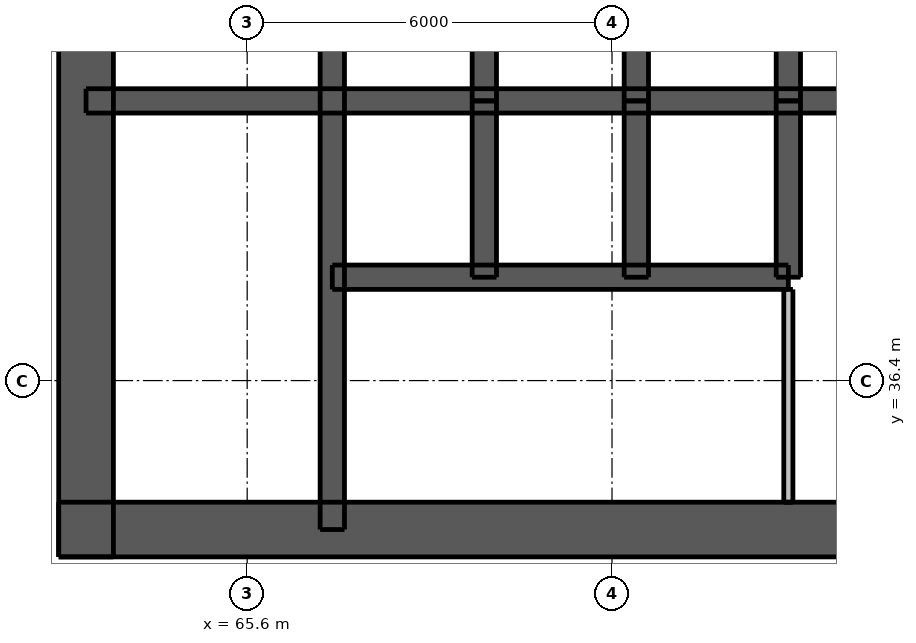
"""IFC4 building model, lengths in metres.
Left out: names, types, materials, properties, quantities, classifications, styles, units other than length and angle.
Written with IfcOpenShell. Run it as: python <this file> out.ifc"""

import sys

from ifc_helpers import new_model, si_unit, direction, frame, frame_2d, origin, place, context, subcontext, project, spatial, rectangle, extrude, element, fill, save


model = new_model("IFC4")
c1 = context("Model", 3, precision=1e-05, world=origin(), true_north=direction((0.0, 1.0)))
c2 = subcontext(c1, "Body", "Model", "MODEL_VIEW")
j1 = project(units=[si_unit("LENGTHUNIT", "METRE"), si_unit("PLANEANGLEUNIT", "RADIAN")], contexts=[c1])
p1 = place(None, origin())
s1 = spatial("IfcSite", under=j1, at=p1, CompositionType="ELEMENT")
p2 = place(p1, origin())
s2 = spatial("IfcBuilding", under=s1, at=p2, CompositionType="ELEMENT")
p3 = place(p2, frame((0.0, 0.0, 56.5)))
s3 = spatial("IfcBuildingStorey", under=s2, at=p3, CompositionType="ELEMENT", Elevation=56.5)
p4 = place(p3, frame((62.5, 33.95, 0.0), z_axis=(0.0, 0.0, 1.0), x_axis=(1.0, 0.0, 0.0)))
e1 = element("IfcWall", 1, at=p4, inside=s3, PredefinedType="SHEAR", context=c2, shape_type="SweptSolid", body=[
    extrude(rectangle(XDim=24.0, YDim=0.9, at=frame_2d((12.0, 0.0))), origin(), (0.0, 0.0, 1.0), 3.05),
])
p5 = place(p4, frame((2.05, 0.0, 0.0)))
e2 = element("IfcOpeningElement", 2, at=p5, cuts=e1, PredefinedType="OPENING", context=c2, shape_type="SweptSolid", body=[
    extrude(rectangle(XDim=1.1, YDim=2.1, at=frame_2d((0.55, 1.05))), frame((0.0, 0.46, 0.0), z_axis=(0.0, -1.0, 0.0), x_axis=(1.0, 0.0, 0.0)), (0.0, 0.0, 1.0), 0.92),
])
p6 = place(p4, frame((20.85, 0.0, 0.0)))
e3 = element("IfcOpeningElement", 3, at=p6, cuts=e1, PredefinedType="OPENING", context=c2, shape_type="SweptSolid", body=[
    extrude(rectangle(XDim=1.1, YDim=2.1, at=frame_2d((0.55, 1.05))), frame((0.0, 0.46, 0.0), z_axis=(0.0, -1.0, 0.0), x_axis=(1.0, 0.0, 0.0)), (0.0, 0.0, 1.0), 0.92),
])
p7 = place(p4, frame((8.0, 0.0, 0.0)))
e4 = element("IfcOpeningElement", 4, at=p7, cuts=e1, PredefinedType="OPENING", context=c2, shape_type="SweptSolid", body=[
    extrude(rectangle(XDim=1.1, YDim=2.1, at=frame_2d((0.55, 1.05))), frame((0.0, 0.46, 0.0), z_axis=(0.0, -1.0, 0.0), x_axis=(1.0, 0.0, 0.0)), (0.0, 0.0, 1.0), 0.92),
])
p8 = place(p4, frame((13.525, 0.0, 0.0)))
e5 = element("IfcOpeningElement", 5, at=p8, cuts=e1, PredefinedType="OPENING", context=c2, shape_type="SweptSolid", body=[
    extrude(rectangle(XDim=0.9, YDim=2.1, at=frame_2d((0.45, 1.05))), frame((0.0, 0.46, 0.0), z_axis=(0.0, -1.0, 0.0), x_axis=(1.0, 0.0, 0.0)), (0.0, 0.0, 1.0), 0.92),
])
p9 = place(p4, frame((17.075, 0.0, 0.0)))
e6 = element("IfcOpeningElement", 6, at=p9, cuts=e1, PredefinedType="OPENING", context=c2, shape_type="SweptSolid", body=[
    extrude(rectangle(XDim=0.9, YDim=2.1, at=frame_2d((0.45, 1.05))), frame((0.0, 0.46, 0.0), z_axis=(0.0, -1.0, 0.0), x_axis=(1.0, 0.0, 0.0)), (0.0, 0.0, 1.0), 0.92),
])
p10 = place(p3, frame((62.95, 33.5, 0.0), z_axis=(0.0, 0.0, 1.0), x_axis=(0.0, 1.0, 0.0)))
e7 = element("IfcWall", 7, at=p10, inside=s3, PredefinedType="SHEAR", context=c2, shape_type="SweptSolid", body=[
    extrude(rectangle(XDim=24.0, YDim=0.9, at=frame_2d((12.0, 0.0))), origin(), (0.0, 0.0, 1.0), 3.05),
])
p11 = place(p10, frame((11.2, 0.0, 0.0)))
e8 = element("IfcOpeningElement", 8, at=p11, cuts=e7, PredefinedType="OPENING", context=c2, shape_type="SweptSolid", body=[
    extrude(rectangle(XDim=1.6, YDim=2.1, at=frame_2d((0.8, 1.05))), frame((0.0, 0.46, 0.0), z_axis=(0.0, -1.0, 0.0), x_axis=(1.0, 0.0, 0.0)), (0.0, 0.0, 1.0), 0.92),
])
p12 = place(p3, frame((62.95, 41.0, 0.0), z_axis=(0.0, 0.0, 1.0), x_axis=(1.0, 0.0, 0.0)))
e9 = element("IfcWall", 9, at=p12, inside=s3, PredefinedType="SHEAR", context=c2, shape_type="SweptSolid", body=[
    extrude(rectangle(XDim=23.1, YDim=0.4, at=frame_2d((11.55, 0.0))), origin(), (0.0, 0.0, 1.0), 3.05),
])
p13 = place(p3, frame((67.0, 33.95, 0.0), z_axis=(0.0, 0.0, 1.0), x_axis=(0.0, 1.0, 0.0)))
e10 = element("IfcWall", 10, at=p13, inside=s3, PredefinedType="SHEAR", context=c2, shape_type="SweptSolid", body=[
    extrude(rectangle(XDim=9.95, YDim=0.4, at=frame_2d((4.975, 0.0))), origin(), (0.0, 0.0, 1.0), 3.05),
])
p14 = place(p13, frame((0.65, 0.0, 0.0)))
e11 = element("IfcOpeningElement", 11, at=p14, cuts=e10, PredefinedType="OPENING", context=c2, shape_type="SweptSolid", body=[
    extrude(rectangle(XDim=1.1, YDim=2.1, at=frame_2d((0.55, 1.05))), frame((0.0, 0.21, 0.0), z_axis=(0.0, -1.0, 0.0), x_axis=(1.0, 0.0, 0.0)), (0.0, 0.0, 1.0), 0.42),
])
for number, where, z_axis, x_axis in (
    (12, (69.5, 41.0, 0.0), (0.0, 0.0, 1.0), (0.0, 1.0, 0.0)),
    (13, (72.0, 41.0, 0.0), (0.0, 0.0, 1.0), (0.0, 1.0, 0.0)),
    (14, (74.5, 41.0, 0.0), (0.0, 0.0, 1.0), (0.0, 1.0, 0.0)),
):
    element("IfcWall", number, at=place(p3, frame(where, z_axis=z_axis, x_axis=x_axis)), inside=s3, PredefinedType="SHEAR", context=c2, shape_type="SweptSolid", body=[
        extrude(rectangle(XDim=2.9, YDim=0.4, at=frame_2d((1.45, 0.0))), origin(), (0.0, 0.0, 1.0), 3.05),
    ])
p15 = place(p3, frame((67.0, 38.1, 0.0), z_axis=(0.0, 0.0, 1.0), x_axis=(1.0, 0.0, 0.0)))
e15 = element("IfcWall", 15, at=p15, inside=s3, PredefinedType="SHEAR", context=c2, shape_type="SweptSolid", body=[
    extrude(rectangle(XDim=7.5, YDim=0.4, at=frame_2d((3.75, 0.0))), origin(), (0.0, 0.0, 1.0), 3.05),
])
p16 = place(p15, frame((0.7, 0.0, 0.0)))
e16 = element("IfcOpeningElement", 16, at=p16, cuts=e15, PredefinedType="OPENING", context=c2, shape_type="SweptSolid", body=[
    extrude(rectangle(XDim=1.1, YDim=2.1, at=frame_2d((0.55, 1.05))), frame((0.0, 0.21, 0.0), z_axis=(0.0, -1.0, 0.0), x_axis=(1.0, 0.0, 0.0)), (0.0, 0.0, 1.0), 0.42),
])
p17 = place(p15, frame((3.2, 0.0, 0.0)))
e17 = element("IfcOpeningElement", 17, at=p17, cuts=e15, PredefinedType="OPENING", context=c2, shape_type="SweptSolid", body=[
    extrude(rectangle(XDim=1.1, YDim=2.1, at=frame_2d((0.55, 1.05))), frame((0.0, 0.21, 0.0), z_axis=(0.0, -1.0, 0.0), x_axis=(1.0, 0.0, 0.0)), (0.0, 0.0, 1.0), 0.42),
])
p18 = place(p15, frame((5.65, 0.0, 0.0)))
e18 = element("IfcOpeningElement", 18, at=p18, cuts=e15, PredefinedType="OPENING", context=c2, shape_type="SweptSolid", body=[
    extrude(rectangle(XDim=1.2, YDim=2.1, at=frame_2d((0.6, 1.05))), frame((0.0, 0.21, 0.0), z_axis=(0.0, -1.0, 0.0), x_axis=(1.0, 0.0, 0.0)), (0.0, 0.0, 1.0), 0.42),
])
for number, where, z_axis, x_axis in (
    (19, (69.5, 38.1, 0.0), (0.0, 0.0, 1.0), (0.0, 1.0, 0.0)),
    (20, (72.0, 38.1, 0.0), (0.0, 0.0, 1.0), (0.0, 1.0, 0.0)),
    (21, (74.5, 38.1, 0.0), (0.0, 0.0, 1.0), (0.0, 1.0, 0.0)),
):
    element("IfcWall", number, at=place(p3, frame(where, z_axis=z_axis, x_axis=x_axis)), inside=s3, PredefinedType="SHEAR", context=c2, shape_type="SweptSolid", body=[
        extrude(rectangle(XDim=2.9, YDim=0.4, at=frame_2d((1.45, 0.0))), origin(), (0.0, 0.0, 1.0), 3.05),
    ])
p19 = place(p3, frame((74.5, 34.4, 0.0), z_axis=(0.0, 0.0, 1.0), x_axis=(0.0, 1.0, 0.0)))
e22 = element("IfcWall", 22, at=p19, inside=s3, PredefinedType="PLUMBINGWALL", context=c2, shape_type="SweptSolid", body=[
    extrude(rectangle(XDim=3.5, YDim=0.15, at=frame_2d((1.75, 0.0))), origin(), (0.0, 0.0, 1.0), 3.05),
])
p20 = place(p5, origin())
e23 = element("IfcDoor", 23, at=p20, inside=s3, OperationType="SINGLE_SWING_LEFT", PredefinedType="DOOR", context=c2, shape_type="SweptSolid", body=[
    extrude(rectangle(XDim=1.1, YDim=2.1, at=frame_2d((0.55, 1.05))), frame((0.0, 0.438, 0.0), z_axis=(0.0, -1.0, 0.0), x_axis=(1.0, 0.0, 0.0)), (0.0, 0.0, 1.0), 0.05),
])
fill(e2, e23)
p21 = place(p7, origin())
e24 = element("IfcDoor", 24, at=p21, inside=s3, OperationType="SINGLE_SWING_LEFT", PredefinedType="DOOR", context=c2, shape_type="SweptSolid", body=[
    extrude(rectangle(XDim=1.1, YDim=2.1, at=frame_2d((0.55, 1.05))), frame((0.0, 0.438, 0.0), z_axis=(0.0, -1.0, 0.0), x_axis=(1.0, 0.0, 0.0)), (0.0, 0.0, 1.0), 0.05),
])
fill(e4, e24)
p22 = place(p14, origin())
e25 = element("IfcDoor", 25, at=p22, inside=s3, OperationType="SINGLE_SWING_RIGHT", PredefinedType="DOOR", context=c2, shape_type="SweptSolid", body=[
    extrude(rectangle(XDim=1.1, YDim=2.1, at=frame_2d((0.55, 1.05))), frame((0.0, -0.138, 0.0), z_axis=(0.0, -1.0, 0.0), x_axis=(1.0, 0.0, 0.0)), (0.0, 0.0, 1.0), 0.05),
])
fill(e11, e25)
p23 = place(p16, origin())
e26 = element("IfcDoor", 26, at=p23, inside=s3, OperationType="DOUBLE_DOOR_SLIDING", PredefinedType="DOOR", context=c2, shape_type="SweptSolid", body=[
    extrude(rectangle(XDim=1.1, YDim=2.1, at=frame_2d((0.55, 1.05))), frame((0.0, 0.025, 0.0), z_axis=(0.0, -1.0, 0.0), x_axis=(1.0, 0.0, 0.0)), (0.0, 0.0, 1.0), 0.05),
])
fill(e16, e26)
p24 = place(p17, origin())
e27 = element("IfcDoor", 27, at=p24, inside=s3, OperationType="DOUBLE_DOOR_SLIDING", PredefinedType="DOOR", context=c2, shape_type="SweptSolid", body=[
    extrude(rectangle(XDim=1.1, YDim=2.1, at=frame_2d((0.55, 1.05))), frame((0.0, 0.025, 0.0), z_axis=(0.0, -1.0, 0.0), x_axis=(1.0, 0.0, 0.0)), (0.0, 0.0, 1.0), 0.05),
])
fill(e17, e27)
p25 = place(p18, origin())
e28 = element("IfcDoor", 28, at=p25, inside=s3, OperationType="DOUBLE_DOOR_SLIDING", PredefinedType="DOOR", context=c2, shape_type="SweptSolid", body=[
    extrude(rectangle(XDim=1.2, YDim=2.1, at=frame_2d((0.6, 1.05))), frame((0.0, 0.025, 0.0), z_axis=(0.0, -1.0, 0.0), x_axis=(1.0, 0.0, 0.0)), (0.0, 0.0, 1.0), 0.05),
])
fill(e18, e28)
save(model, sys.argv[1])
